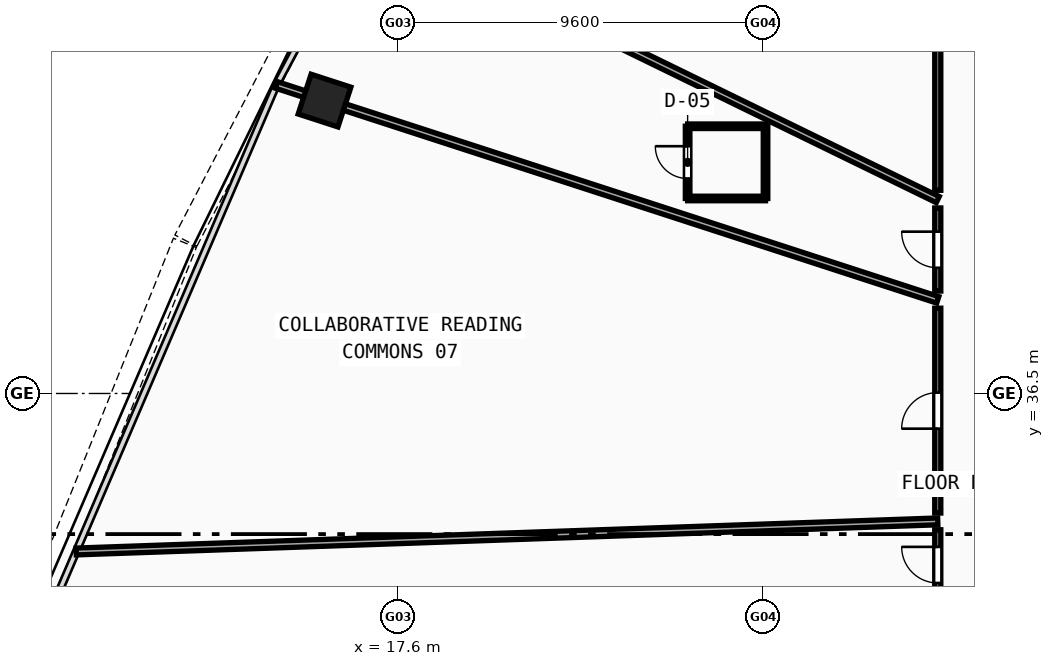
"""IFC4 building model, lengths in metres.
Left out: names, types, materials, properties, quantities, classifications, styles, units other than length and angle.
Written with IfcOpenShell. Run it as: python <this file> out.ifc"""

import sys

from ifc_helpers import new_model, si_unit, direction, frame, frame_2d, origin, origin_with_axes, origin_2d, place, context, subcontext, project, spatial, rectangle, hollow_rectangle, extrude, source, transform, mapped, element, fill, save


model = new_model("IFC4")
c1 = context("Model", 3, precision=1e-05, world=origin(), true_north=direction((0.0, 1.0)))
c2 = subcontext(c1, "Body", "Model", "MODEL_VIEW")
j1 = project(units=[si_unit("LENGTHUNIT", "METRE"), si_unit("PLANEANGLEUNIT", "RADIAN")], contexts=[c1])
p1 = place(None, origin())
s1 = spatial("IfcSite", under=j1, at=p1, CompositionType="ELEMENT")
p2 = place(p1, origin())
s2 = spatial("IfcBuilding", under=s1, at=p2, CompositionType="ELEMENT")
p3 = place(p2, frame((0.0, 0.0, 52.18)))
s3 = spatial("IfcBuildingStorey", under=s2, at=p3, CompositionType="ELEMENT", Elevation=52.18)
m1 = source(origin(), c2, "Body", "SweptSolid", [
    extrude(hollow_rectangle(XDim=1.1, YDim=1.1, WallThickness=0.045, at=origin_2d()), origin(), (0.0, 0.0, 1.0), 3.63),
])
p4 = place(p3, frame((15.665, 44.206, -0.26), z_axis=(0.0, 0.0, 1.0), x_axis=(-0.309016994375, -0.951056516295, 0.0)))
e1 = element("IfcColumn", 1, at=p4, inside=s3, PredefinedType="COLUMN", context=c2, shape_type="MappedRepresentation", body=[
    mapped(m1, transform((0.0, 0.0, 0.0), scale=1.0)),
])
p5 = place(p3, frame((31.8, 41.601, 0.0), z_axis=(0.0, 0.0, 1.0), x_axis=(-0.898795978277, 0.438367185625, 0.0)))
e2 = element("IfcWall", 2, at=p5, inside=s3, PredefinedType="PARTITIONING", context=c2, shape_type="SweptSolid", body=[
    extrude(rectangle(XDim=16.788, YDim=0.18, at=frame_2d((8.394, 0.0))), origin(), (0.0, 0.0, 1.0), 2.67),
])
p6 = place(p3, frame((31.8, 38.964, 0.0), z_axis=(0.0, 0.0, 1.0), x_axis=(-0.951052304058, 0.309029958006, 0.0)))
e3 = element("IfcWall", 3, at=p6, inside=s3, PredefinedType="PARTITIONING", context=c2, shape_type="SweptSolid", body=[
    extrude(rectangle(XDim=18.299, YDim=0.18, at=frame_2d((9.149, 0.0))), origin(), (0.0, 0.0, 1.0), 2.67),
])
p7 = place(p3, frame((31.8, 33.134, 0.0), z_axis=(0.0, 0.0, 1.0), x_axis=(-0.999390651746, -0.034904515515, 0.0)))
e4 = element("IfcWall", 4, at=p7, inside=s3, PredefinedType="PARTITIONING", context=c2, shape_type="SweptSolid", body=[
    extrude(rectangle(XDim=22.683, YDim=0.18, at=frame_2d((11.342, 0.0))), origin(), (0.0, 0.0, 1.0), 2.67),
])
p8 = place(p3, frame((31.8, 31.063, 0.0), z_axis=(0.0, 0.0, 1.0), x_axis=(0.0, 1.0, 0.0)))
e5 = element("IfcWall", 5, at=p8, inside=s3, PredefinedType="PARTITIONING", context=c2, shape_type="SweptSolid", body=[
    extrude(rectangle(XDim=1.851, YDim=0.16, at=frame_2d((0.926, 0.0))), origin(), (0.0, 0.0, 1.0), 3.37),
])
p9 = place(p8, frame((0.451, 0.0, 0.0)))
e6 = element("IfcOpeningElement", 6, at=p9, cuts=e5, PredefinedType="OPENING", context=c2, shape_type="SweptSolid", body=[
    extrude(rectangle(XDim=0.95, YDim=2.1, at=frame_2d((0.475, 1.05))), frame((0.0, 0.09, 0.0), z_axis=(0.0, -1.0, 0.0), x_axis=(1.0, 0.0, 0.0)), (0.0, 0.0, 1.0), 0.18),
])
p10 = place(p3, frame((31.8, 33.354, 0.0), z_axis=(0.0, 0.0, 1.0), x_axis=(0.0, 1.0, 0.0)))
e7 = element("IfcWall", 7, at=p10, inside=s3, PredefinedType="PARTITIONING", context=c2, shape_type="SweptSolid", body=[
    extrude(rectangle(XDim=5.39, YDim=0.16, at=frame_2d((2.695, 0.0))), origin(), (0.0, 0.0, 1.0), 3.37),
])
p11 = place(p10, frame((2.22, 0.0, 0.0)))
e8 = element("IfcOpeningElement", 8, at=p11, cuts=e7, PredefinedType="OPENING", context=c2, shape_type="SweptSolid", body=[
    extrude(rectangle(XDim=0.95, YDim=2.1, at=frame_2d((0.475, 1.05))), frame((0.0, 0.09, 0.0), z_axis=(0.0, -1.0, 0.0), x_axis=(1.0, 0.0, 0.0)), (0.0, 0.0, 1.0), 0.18),
])
p12 = place(p3, frame((31.8, 39.195, 0.0), z_axis=(0.0, 0.0, 1.0), x_axis=(0.0, 1.0, 0.0)))
e9 = element("IfcWall", 9, at=p12, inside=s3, PredefinedType="PARTITIONING", context=c2, shape_type="SweptSolid", body=[
    extrude(rectangle(XDim=2.187, YDim=0.16, at=frame_2d((1.093, 0.0))), origin(), (0.0, 0.0, 1.0), 3.37),
])
p13 = place(p12, frame((0.613, 0.0, 0.0)))
e10 = element("IfcOpeningElement", 10, at=p13, cuts=e9, PredefinedType="OPENING", context=c2, shape_type="SweptSolid", body=[
    extrude(rectangle(XDim=0.95, YDim=2.1, at=frame_2d((0.475, 1.05))), frame((0.0, 0.09, 0.0), z_axis=(0.0, -1.0, 0.0), x_axis=(1.0, 0.0, 0.0)), (0.0, 0.0, 1.0), 0.18),
])
p14 = place(p3, frame((31.8, 41.846, 0.0), z_axis=(0.0, 0.0, 1.0), x_axis=(0.0, 1.0, 0.0)))
e11 = element("IfcWall", 11, at=p14, inside=s3, PredefinedType="PARTITIONING", context=c2, shape_type="SweptSolid", body=[
    extrude(rectangle(XDim=6.804, YDim=0.16, at=frame_2d((3.402, 0.0))), origin(), (0.0, 0.0, 1.0), 2.67),
])
p15 = place(p3, frame((25.218, 41.631, 0.0), z_axis=(0.0, 0.0, 1.0), x_axis=(1.0, 0.0, 0.0)))
e12 = element("IfcWall", 12, at=p15, inside=s3, PredefinedType="PARTITIONING", context=c2, shape_type="SweptSolid", body=[
    extrude(rectangle(XDim=2.05, YDim=0.12, at=frame_2d((1.025, 0.0))), origin(), (0.0, 0.0, 1.0), 3.37),
])
p16 = place(p3, frame((27.268, 41.631, 0.0), z_axis=(0.0, 0.0, 1.0), x_axis=(0.0, 1.0, 0.0)))
e13 = element("IfcWall", 13, at=p16, inside=s3, PredefinedType="PARTITIONING", context=c2, shape_type="SweptSolid", body=[
    extrude(rectangle(XDim=1.9, YDim=0.12, at=frame_2d((0.95, 0.0))), origin(), (0.0, 0.0, 1.0), 3.37),
])
p17 = place(p3, frame((27.268, 43.531, 0.0), z_axis=(0.0, 0.0, 1.0), x_axis=(-1.0, 0.0, 0.0)))
e14 = element("IfcWall", 14, at=p17, inside=s3, PredefinedType="PARTITIONING", context=c2, shape_type="SweptSolid", body=[
    extrude(rectangle(XDim=2.05, YDim=0.12, at=frame_2d((1.025, 0.0))), origin(), (0.0, 0.0, 1.0), 3.37),
])
p18 = place(p3, frame((25.218, 43.531, 0.0), z_axis=(0.0, 0.0, 1.0), x_axis=(0.0, -1.0, 0.0)))
e15 = element("IfcWall", 15, at=p18, inside=s3, PredefinedType="PARTITIONING", context=c2, shape_type="SweptSolid", body=[
    extrude(rectangle(XDim=1.9, YDim=0.12, at=frame_2d((0.95, 0.0))), origin(), (0.0, 0.0, 1.0), 3.37),
])
p19 = place(p18, frame((0.525, 0.0, 0.0)))
e16 = element("IfcOpeningElement", 16, at=p19, cuts=e15, PredefinedType="OPENING", context=c2, shape_type="SweptSolid", body=[
    extrude(rectangle(XDim=0.85, YDim=2.1, at=frame_2d((0.425, 1.05))), frame((0.0, 0.07, 0.0), z_axis=(0.0, -1.0, 0.0), x_axis=(1.0, 0.0, 0.0)), (0.0, 0.0, 1.0), 0.14),
])
m2 = source(origin(), c2, "Body", "SweptSolid", [
    extrude(rectangle(XDim=0.95, YDim=2.1, at=frame_2d((0.475, 1.05))), frame((0.0, 0.025, 0.0), z_axis=(0.0, -1.0, 0.0), x_axis=(1.0, 0.0, 0.0)), (0.0, 0.0, 1.0), 0.05),
])
p20 = place(p13, origin_with_axes())
e17 = element("IfcDoor", 17, at=p20, inside=s3, OperationType="SINGLE_SWING_RIGHT", PredefinedType="DOOR", context=c2, shape_type="MappedRepresentation", body=[
    mapped(m2, transform((0.0, 0.0, 0.0), scale=1.0)),
])
fill(e10, e17)
m3 = source(origin(), c2, "Body", "SweptSolid", [
    extrude(rectangle(XDim=0.85, YDim=2.1, at=frame_2d((0.425, 1.05))), frame((0.0, 0.025, 0.0), z_axis=(0.0, -1.0, 0.0), x_axis=(1.0, 0.0, 0.0)), (0.0, 0.0, 1.0), 0.05),
])
p21 = place(p19, frame((0.85, 0.0, 0.0), z_axis=(0.0, 0.0, 1.0), x_axis=(-1.0, 0.0, 0.0)))
e18 = element("IfcDoor", 18, at=p21, inside=s3, OperationType="SINGLE_SWING_RIGHT", PredefinedType="DOOR", context=c2, shape_type="MappedRepresentation", body=[
    mapped(m3, transform((0.0, 0.0, 0.0), scale=1.0)),
])
fill(e16, e18)
p22 = place(p11, origin_with_axes())
e19 = element("IfcDoor", 19, at=p22, inside=s3, OperationType="SINGLE_SWING_LEFT", PredefinedType="DOOR", context=c2, shape_type="MappedRepresentation", body=[
    mapped(m2, transform((0.0, 0.0, 0.0), scale=1.0)),
])
fill(e8, e19)
p23 = place(p9, origin_with_axes())
e20 = element("IfcDoor", 20, at=p23, inside=s3, OperationType="SINGLE_SWING_RIGHT", PredefinedType="DOOR", context=c2, shape_type="MappedRepresentation", body=[
    mapped(m2, transform((0.0, 0.0, 0.0), scale=1.0)),
])
fill(e6, e20)
save(model, sys.argv[1])
